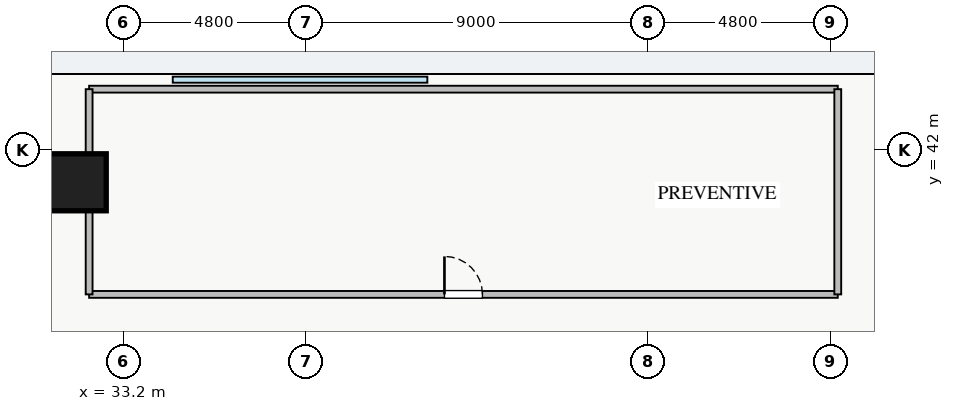
"""IFC4 building model, lengths in metres.
Left out: names, types, materials, properties, quantities, classifications, styles, units other than length and angle.
Written with IfcOpenShell. Run it as: python <this file> out.ifc"""

import sys

from ifc_helpers import new_model, si_unit, direction, frame, frame_2d, origin, origin_2d, place, context, subcontext, project, spatial, rectangle, extrude, source, transform, mapped, element, fill, save


model = new_model("IFC4")
c1 = context("Model", 3, precision=1e-05, world=origin(), true_north=direction((0.0, 1.0)))
c2 = subcontext(c1, "Body", "Model", "MODEL_VIEW")
j1 = project(units=[si_unit("LENGTHUNIT", "METRE"), si_unit("PLANEANGLEUNIT", "RADIAN")], contexts=[c1])
p1 = place(None, origin())
s1 = spatial("IfcSite", under=j1, at=p1, CompositionType="ELEMENT")
p2 = place(p1, origin())
s2 = spatial("IfcBuilding", under=s1, at=p2, CompositionType="ELEMENT")
p3 = place(p2, frame((0.0, 0.0, 5.0)))
s3 = spatial("IfcBuildingStorey", under=s2, at=p3, CompositionType="ELEMENT", Elevation=5.0)
m1 = source(origin(), c2, "Body", "SweptSolid", [
    extrude(rectangle(XDim=1.5, YDim=1.5, at=origin_2d()), origin(), (0.0, 0.0, 1.0), 4.4),
])
p4 = place(p3, frame((32.0, 41.15, 0.0), z_axis=(0.0, 0.0, 1.0), x_axis=(1.0, 0.0, 0.0)))
e1 = element("IfcColumn", 1, at=p4, inside=s3, PredefinedType="COLUMN", context=c2, shape_type="MappedRepresentation", body=[
    mapped(m1, transform((0.0, 0.0, 0.0), x_axis=(1.0, 0.0, 0.0), y_axis=(0.0, 1.0, 0.0), z_axis=(0.0, 0.0, 1.0), scale=1.0)),
])
p5 = place(p3, frame((32.3, 38.2, 0.0), z_axis=(0.0, 0.0, 1.0), x_axis=(1.0, 0.0, 0.0)))
e2 = element("IfcWall", 2, at=p5, inside=s3, PredefinedType="PARTITIONING", context=c2, shape_type="SweptSolid", body=[
    extrude(rectangle(XDim=19.7, YDim=0.18, at=frame_2d((9.85, 0.0))), origin(), (0.0, 0.0, 1.0), 4.18),
])
p6 = place(p5, frame((9.35, 0.0, 0.0)))
e3 = element("IfcOpeningElement", 3, at=p6, cuts=e2, PredefinedType="OPENING", context=c2, shape_type="SweptSolid", body=[
    extrude(rectangle(XDim=1.0, YDim=2.05, at=frame_2d((0.5, 1.025))), frame((0.0, 0.1, 0.0), z_axis=(0.0, -1.0, 0.0), x_axis=(1.0, 0.0, 0.0)), (0.0, 0.0, 1.0), 0.2),
])
p7 = place(p3, frame((32.3, 43.6, 0.0), z_axis=(0.0, 0.0, 1.0), x_axis=(1.0, 0.0, 0.0)))
e4 = element("IfcWall", 4, at=p7, inside=s3, PredefinedType="PARTITIONING", context=c2, shape_type="SweptSolid", body=[
    extrude(rectangle(XDim=19.7, YDim=0.18, at=frame_2d((9.85, 0.0))), origin(), (0.0, 0.0, 1.0), 4.18),
])
for number, where, z_axis, x_axis in (
    (5, (32.3, 38.2, 0.0), (0.0, 0.0, 1.0), (0.0, 1.0, 0.0)),
    (6, (52.0, 38.2, 0.0), (0.0, 0.0, 1.0), (0.0, 1.0, 0.0)),
):
    element("IfcWall", number, at=place(p3, frame(where, z_axis=z_axis, x_axis=x_axis)), inside=s3, PredefinedType="PARTITIONING", context=c2, shape_type="SweptSolid", body=[
        extrude(rectangle(XDim=5.4, YDim=0.18, at=frame_2d((2.7, 0.0))), origin(), (0.0, 0.0, 1.0), 4.18),
    ])
m2 = source(origin(), c2, "Body", "SweptSolid", [
    extrude(rectangle(XDim=1.0, YDim=2.05, at=frame_2d((0.5, 1.025))), frame((0.0, 0.025, 0.0), z_axis=(0.0, -1.0, 0.0), x_axis=(1.0, 0.0, 0.0)), (0.0, 0.0, 1.0), 0.05),
])
p8 = place(p6, origin())
e7 = element("IfcDoor", 7, at=p8, inside=s3, OperationType="SINGLE_SWING_LEFT", PredefinedType="DOOR", context=c2, shape_type="MappedRepresentation", body=[
    mapped(m2, transform((0.0, 0.0, 0.0), x_axis=(1.0, 0.0, 0.0), y_axis=(0.0, 1.0, 0.0), z_axis=(0.0, 0.0, 1.0), scale=1.0)),
])
fill(e3, e7)
save(model, sys.argv[1])
